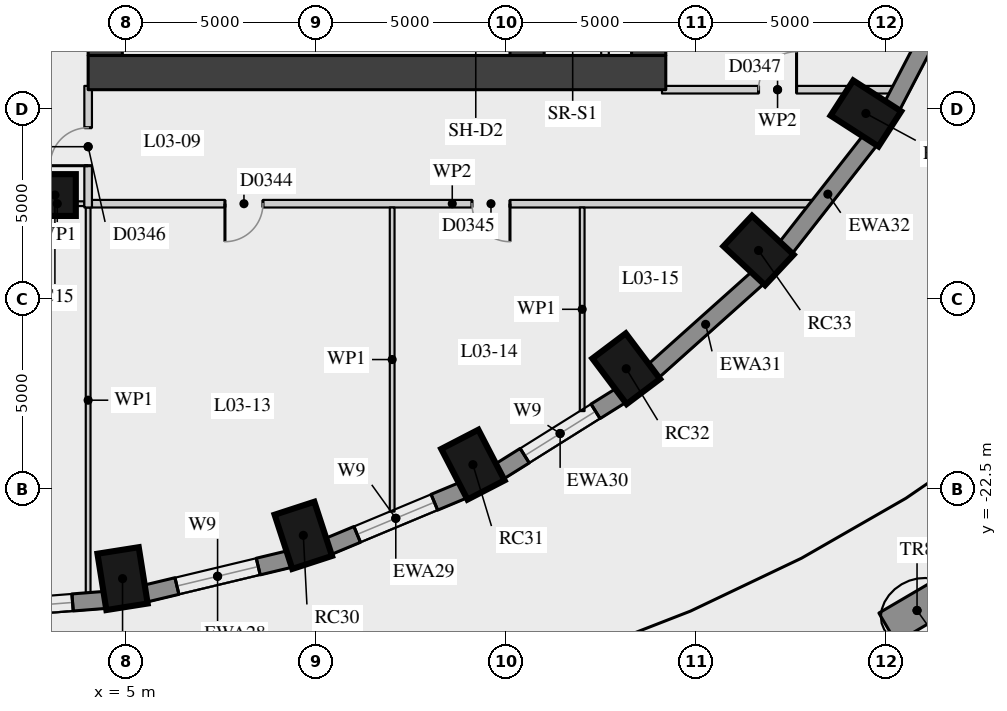
"""IFC4 building model, lengths in metres.
Left out: names, types, materials, properties, quantities, classifications, styles, units other than length and angle.
Written with IfcOpenShell. Run it as: python <this file> out.ifc"""

import sys

from ifc_helpers import new_model, si_unit, direction, frame, frame_2d, origin, origin_2d, place, context, subcontext, project, spatial, rectangle, extrude, element, fill, save


model = new_model("IFC4")
c1 = context("Model", 3, precision=1e-05, world=origin(), true_north=direction((0.0, 1.0)))
c2 = subcontext(c1, "Body", "Model", "MODEL_VIEW")
j1 = project(units=[si_unit("LENGTHUNIT", "METRE"), si_unit("PLANEANGLEUNIT", "RADIAN")], contexts=[c1])
p1 = place(None, origin())
s1 = spatial("IfcSite", under=j1, at=p1, CompositionType="ELEMENT")
p2 = place(p1, origin())
s2 = spatial("IfcBuilding", under=s1, at=p2, CompositionType="ELEMENT")
p3 = place(p2, frame((0.0, 0.0, 17.5)))
s3 = spatial("IfcBuildingStorey", under=s2, at=p3, CompositionType="ELEMENT", Elevation=17.5)
for number, where, z_axis, x_axis in (
    (1, (4.906, -24.866, 0.0), (0.0, 0.0, 1.0), (0.156, -0.988, 0.0)),
    (2, (9.662, -23.727, 0.0), (0.0, 0.0, 1.0), (0.31, -0.951, 0.0)),
    (3, (14.125, -21.867, 0.0), (0.0, 0.0, 1.0), (0.46, -0.888, 0.0)),
    (4, (18.159, -19.343, 0.0), (0.0, 0.0, 1.0), (0.601, -0.799, 0.0)),
    (5, (21.641, -16.23, 0.0), (0.0, 0.0, 1.0), (0.73, -0.683, 0.0)),
    (6, (24.465, -12.625, 0.0), (0.0, 0.0, 1.0), (0.841, -0.541, 0.0)),
):
    element("IfcColumn", number, at=place(p3, frame(where, z_axis=z_axis, x_axis=x_axis)), inside=s3, PredefinedType="COLUMN", context=c2, shape_type="SweptSolid", body=[
        extrude(rectangle(XDim=1.5, YDim=1.1, at=origin_2d()), origin(), (0.0, 0.0, 1.0), 4.2),
    ])
p4 = place(p3, frame((3.126, -14.772, 0.0), z_axis=(0.0, 0.0, 1.0), x_axis=(1.0, 0.0, 0.0)))
e7 = element("IfcColumn", 7, at=p4, inside=s3, PredefinedType="COLUMN", context=c2, shape_type="SweptSolid", body=[
    extrude(rectangle(XDim=1.1, YDim=1.1, at=origin_2d()), origin(), (0.0, 0.0, 1.0), 4.2),
])
p5 = place(p3, frame((0.53, -25.733, 0.0), z_axis=(0.0, 0.0, 1.0), x_axis=(0.996955972145, 0.077966592873, 0.0)))
e8 = element("IfcWall", 8, at=p5, inside=s3, PredefinedType="SOLIDWALL", context=c2, shape_type="SweptSolid", body=[
    extrude(rectangle(XDim=3.939, YDim=0.45, at=frame_2d((1.97, 0.0))), origin(), (0.0, 0.0, 1.0), 3.92),
])
p6 = place(p5, frame((0.87, 0.0, 0.4)))
e9 = element("IfcOpeningElement", 9, at=p6, cuts=e8, PredefinedType="OPENING", context=c2, shape_type="SweptSolid", body=[
    extrude(rectangle(XDim=2.2, YDim=2.8, at=frame_2d((1.1, 1.4))), frame((0.0, 0.235, 0.0), z_axis=(0.0, -1.0, 0.0), x_axis=(1.0, 0.0, 0.0)), (0.0, 0.0, 1.0), 0.47),
])
p7 = place(p3, frame((5.504, -25.26, 0.0), z_axis=(0.0, 0.0, 1.0), x_axis=(0.972496561493, 0.232917233979, 0.0)))
e10 = element("IfcWall", 10, at=p7, inside=s3, PredefinedType="SOLIDWALL", context=c2, shape_type="SweptSolid", body=[
    extrude(rectangle(XDim=3.911, YDim=0.45, at=frame_2d((1.956, 0.0))), origin(), (0.0, 0.0, 1.0), 3.92),
])
p8 = place(p7, frame((0.855, 0.0, 0.4)))
e11 = element("IfcOpeningElement", 11, at=p8, cuts=e10, PredefinedType="OPENING", context=c2, shape_type="SweptSolid", body=[
    extrude(rectangle(XDim=2.2, YDim=2.8, at=frame_2d((1.1, 1.4))), frame((0.0, 0.235, 0.0), z_axis=(0.0, -1.0, 0.0), x_axis=(1.0, 0.0, 0.0)), (0.0, 0.0, 1.0), 0.47),
])
p9 = place(p3, frame((10.315, -24.021, 0.0), z_axis=(0.0, 0.0, 1.0), x_axis=(0.923031964282, 0.384723267966, 0.0)))
e12 = element("IfcWall", 12, at=p9, inside=s3, PredefinedType="SOLIDWALL", context=c2, shape_type="SweptSolid", body=[
    extrude(rectangle(XDim=3.856, YDim=0.45, at=frame_2d((1.928, 0.0))), origin(), (0.0, 0.0, 1.0), 3.92),
])
p10 = place(p9, frame((0.828, 0.0, 0.4)))
e13 = element("IfcOpeningElement", 13, at=p10, cuts=e12, PredefinedType="OPENING", context=c2, shape_type="SweptSolid", body=[
    extrude(rectangle(XDim=2.2, YDim=2.8, at=frame_2d((1.1, 1.4))), frame((0.0, 0.235, 0.0), z_axis=(0.0, -1.0, 0.0), x_axis=(1.0, 0.0, 0.0)), (0.0, 0.0, 1.0), 0.47),
])
p11 = place(p3, frame((14.817, -22.051, 0.0), z_axis=(0.0, 0.0, 1.0), x_axis=(0.847635480093, 0.530579016629, 0.0)))
e14 = element("IfcWall", 14, at=p11, inside=s3, PredefinedType="SOLIDWALL", context=c2, shape_type="SweptSolid", body=[
    extrude(rectangle(XDim=3.782, YDim=0.45, at=frame_2d((1.891, 0.0))), origin(), (0.0, 0.0, 1.0), 3.92),
])
p12 = place(p11, frame((0.791, 0.0, 0.4)))
e15 = element("IfcOpeningElement", 15, at=p12, cuts=e14, PredefinedType="OPENING", context=c2, shape_type="SweptSolid", body=[
    extrude(rectangle(XDim=2.2, YDim=2.8, at=frame_2d((1.1, 1.4))), frame((0.0, 0.235, 0.0), z_axis=(0.0, -1.0, 0.0), x_axis=(1.0, 0.0, 0.0)), (0.0, 0.0, 1.0), 0.47),
])
p13 = place(p3, frame((18.871, -19.407, 0.0), z_axis=(0.0, 0.0, 1.0), x_axis=(0.745526233716, 0.66647628228, 0.0)))
e16 = element("IfcWall", 16, at=p13, inside=s3, PredefinedType="SOLIDWALL", context=c2, shape_type="SweptSolid", body=[
    extrude(rectangle(XDim=3.697, YDim=0.45, at=frame_2d((1.848, 0.0))), origin(), (0.0, 0.0, 1.0), 3.92),
])
p14 = place(p3, frame((22.352, -16.17, 0.0), z_axis=(0.0, 0.0, 1.0), x_axis=(0.616661975264, 0.787228053529, 0.0)))
e17 = element("IfcWall", 17, at=p14, inside=s3, PredefinedType="SOLIDWALL", context=c2, shape_type="SweptSolid", body=[
    extrude(rectangle(XDim=3.61, YDim=0.45, at=frame_2d((1.805, 0.0))), origin(), (0.0, 0.0, 1.0), 3.92),
])
p15 = place(p3, frame((25.152, -12.437, 0.0), z_axis=(0.0, 0.0, 1.0), x_axis=(0.462492775226, 0.886623050041, 0.0)))
e18 = element("IfcWall", 18, at=p15, inside=s3, PredefinedType="SOLIDWALL", context=c2, shape_type="SweptSolid", body=[
    extrude(rectangle(XDim=3.532, YDim=0.45, at=frame_2d((1.766, 0.0))), origin(), (0.0, 0.0, 1.0), 3.92),
])
p16 = place(p3, frame((21.914, -29.349, 0.0), z_axis=(0.0, 0.0, 1.0), x_axis=(0.879522517586, 0.47585726963, 0.0)))
e19 = element("IfcWall", 19, at=p16, inside=s3, PredefinedType="PARAPET", context=c2, shape_type="SweptSolid", body=[
    extrude(rectangle(XDim=7.203, YDim=0.25, at=frame_2d((3.602, 0.0))), origin(), (0.0, 0.0, 1.0), 1.2),
])
p17 = place(p3, frame((25.035, -26.16, 0.0), z_axis=(0.0, 0.0, 1.0), x_axis=(0.862655115123, 0.505792598159, 0.0)))
e20 = element("IfcWall", 20, at=p17, inside=s3, PredefinedType="USERDEFINED", context=c2, shape_type="SweptSolid", body=[
    extrude(rectangle(XDim=1.8, YDim=0.9, at=frame_2d((0.9, 0.0))), origin(), (0.0, 0.0, 1.0), 0.75),
])
p18 = place(p3, frame((4.45, -11.1, 0.0), z_axis=(0.0, 0.0, 1.0), x_axis=(0.0, 1.0, 0.0)))
e21 = element("IfcWall", 21, at=p18, inside=s3, PredefinedType="SHEAR", context=c2, shape_type="SweptSolid", body=[
    extrude(rectangle(XDim=22.2, YDim=0.9, at=frame_2d((11.1, 0.0))), origin(), (0.0, 0.0, 1.0), 3.92),
])
p19 = place(p18, frame((2.35, 0.0, 0.0)))
e22 = element("IfcOpeningElement", 22, at=p19, cuts=e21, PredefinedType="OPENING", context=c2, shape_type="SweptSolid", body=[
    extrude(rectangle(XDim=1.5, YDim=2.1, at=frame_2d((0.75, 1.05))), frame((0.0, 0.46, 0.0), z_axis=(0.0, -1.0, 0.0), x_axis=(1.0, 0.0, 0.0)), (0.0, 0.0, 1.0), 0.92),
])
p20 = place(p18, frame((5.45, 0.0, 0.0)))
e23 = element("IfcOpeningElement", 23, at=p20, cuts=e21, PredefinedType="OPENING", context=c2, shape_type="SweptSolid", body=[
    extrude(rectangle(XDim=1.8, YDim=2.1, at=frame_2d((0.9, 1.05))), frame((0.0, 0.46, 0.0), z_axis=(0.0, -1.0, 0.0), x_axis=(1.0, 0.0, 0.0)), (0.0, 0.0, 1.0), 0.92),
])
p21 = place(p18, frame((7.95, 0.0, 0.0)))
e24 = element("IfcOpeningElement", 24, at=p21, cuts=e21, PredefinedType="OPENING", context=c2, shape_type="SweptSolid", body=[
    extrude(rectangle(XDim=1.1, YDim=2.1, at=frame_2d((0.55, 1.05))), frame((0.0, 0.46, 0.0), z_axis=(0.0, -1.0, 0.0), x_axis=(1.0, 0.0, 0.0)), (0.0, 0.0, 1.0), 0.92),
])
p22 = place(p18, frame((10.6, 0.0, 0.0)))
e25 = element("IfcOpeningElement", 25, at=p22, cuts=e21, PredefinedType="OPENING", context=c2, shape_type="SweptSolid", body=[
    extrude(rectangle(XDim=1.0, YDim=2.1, at=frame_2d((0.5, 1.05))), frame((0.0, 0.46, 0.0), z_axis=(0.0, -1.0, 0.0), x_axis=(1.0, 0.0, 0.0)), (0.0, 0.0, 1.0), 0.92),
])
p23 = place(p18, frame((13.15, 0.0, 0.0)))
e26 = element("IfcOpeningElement", 26, at=p23, cuts=e21, PredefinedType="OPENING", context=c2, shape_type="SweptSolid", body=[
    extrude(rectangle(XDim=1.1, YDim=2.1, at=frame_2d((0.55, 1.05))), frame((0.0, 0.46, 0.0), z_axis=(0.0, -1.0, 0.0), x_axis=(1.0, 0.0, 0.0)), (0.0, 0.0, 1.0), 0.92),
])
p24 = place(p18, frame((14.95, 0.0, 0.0)))
e27 = element("IfcOpeningElement", 27, at=p24, cuts=e21, PredefinedType="OPENING", context=c2, shape_type="SweptSolid", body=[
    extrude(rectangle(XDim=1.8, YDim=2.1, at=frame_2d((0.9, 1.05))), frame((0.0, 0.46, 0.0), z_axis=(0.0, -1.0, 0.0), x_axis=(1.0, 0.0, 0.0)), (0.0, 0.0, 1.0), 0.92),
])
p25 = place(p18, frame((18.35, 0.0, 0.0)))
e28 = element("IfcOpeningElement", 28, at=p25, cuts=e21, PredefinedType="OPENING", context=c2, shape_type="SweptSolid", body=[
    extrude(rectangle(XDim=1.5, YDim=2.1, at=frame_2d((0.75, 1.05))), frame((0.0, 0.46, 0.0), z_axis=(0.0, -1.0, 0.0), x_axis=(1.0, 0.0, 0.0)), (0.0, 0.0, 1.0), 0.92),
])
p26 = place(p3, frame((18.75, -11.1, 0.0), z_axis=(0.0, 0.0, 1.0), x_axis=(0.0, 1.0, 0.0)))
e29 = element("IfcWall", 29, at=p26, inside=s3, PredefinedType="SHEAR", context=c2, shape_type="SweptSolid", body=[
    extrude(rectangle(XDim=22.2, YDim=0.9, at=frame_2d((11.1, 0.0))), origin(), (0.0, 0.0, 1.0), 3.92),
])
p27 = place(p3, frame((4.0, -11.55, 0.0), z_axis=(0.0, 0.0, 1.0), x_axis=(1.0, 0.0, 0.0)))
e30 = element("IfcWall", 30, at=p27, inside=s3, PredefinedType="SHEAR", context=c2, shape_type="SweptSolid", body=[
    extrude(rectangle(XDim=15.2, YDim=0.9, at=frame_2d((7.6, 0.0))), origin(), (0.0, 0.0, 1.0), 3.92),
])
p28 = place(p3, frame((15.55, -11.1, 0.0), z_axis=(0.0, 0.0, 1.0), x_axis=(0.0, 1.0, 0.0)))
e31 = element("IfcWall", 31, at=p28, inside=s3, PredefinedType="SHEAR", context=c2, shape_type="SweptSolid", body=[
    extrude(rectangle(XDim=22.2, YDim=0.9, at=frame_2d((11.1, 0.0))), origin(), (0.0, 0.0, 1.0), 3.92),
])
p29 = place(p28, frame((15.6, 0.0, 0.0)))
e32 = element("IfcOpeningElement", 32, at=p29, cuts=e31, PredefinedType="OPENING", context=c2, shape_type="SweptSolid", body=[
    extrude(rectangle(XDim=1.0, YDim=2.1, at=frame_2d((0.5, 1.05))), frame((0.0, 0.46, 0.0), z_axis=(0.0, -1.0, 0.0), x_axis=(1.0, 0.0, 0.0)), (0.0, 0.0, 1.0), 0.92),
])
p30 = place(p28, frame((5.6, 0.0, 0.0)))
e33 = element("IfcOpeningElement", 33, at=p30, cuts=e31, PredefinedType="OPENING", context=c2, shape_type="SweptSolid", body=[
    extrude(rectangle(XDim=1.0, YDim=2.1, at=frame_2d((0.5, 1.05))), frame((0.0, 0.46, 0.0), z_axis=(0.0, -1.0, 0.0), x_axis=(1.0, 0.0, 0.0)), (0.0, 0.0, 1.0), 0.92),
])
p31 = place(p3, frame((17.6, -11.1, 0.0), z_axis=(0.0, 0.0, 1.0), x_axis=(0.0, 1.0, 0.0)))
e34 = element("IfcWall", 34, at=p31, inside=s3, PredefinedType="PARTITIONING", context=c2, shape_type="SweptSolid", body=[
    extrude(rectangle(XDim=3.7, YDim=0.2, at=frame_2d((1.85, 0.0))), origin(), (0.0, 0.0, 1.0), 3.92),
])
p32 = place(p3, frame((2.475, -15.0, 0.0), z_axis=(0.0, 0.0, 1.0), x_axis=(1.0, 0.0, 0.0)))
e35 = element("IfcWall", 35, at=p32, inside=s3, PredefinedType="PARTITIONING", context=c2, shape_type="SweptSolid", body=[
    extrude(rectangle(XDim=1.425, YDim=0.125, at=frame_2d((0.712, 0.0))), origin(), (0.0, 0.0, 1.0), 3.92),
])
p33 = place(p3, frame((4.1, -15.0, 0.0), z_axis=(0.0, 0.0, 1.0), x_axis=(1.0, 0.0, 0.0)))
e36 = element("IfcWall", 36, at=p33, inside=s3, PredefinedType="PARTITIONING", context=c2, shape_type="SweptSolid", body=[
    extrude(rectangle(XDim=18.962, YDim=0.2, at=frame_2d((9.481, 0.0))), origin(), (0.0, 0.0, 1.0), 3.92),
])
p34 = place(p33, frame((3.5, 0.0, 0.0)))
e37 = element("IfcOpeningElement", 37, at=p34, cuts=e36, PredefinedType="OPENING", context=c2, shape_type="SweptSolid", body=[
    extrude(rectangle(XDim=1.0, YDim=2.1, at=frame_2d((0.5, 1.05))), frame((0.0, 0.11, 0.0), z_axis=(0.0, -1.0, 0.0), x_axis=(1.0, 0.0, 0.0)), (0.0, 0.0, 1.0), 0.22),
])
p35 = place(p33, frame((10.0, 0.0, 0.0)))
e38 = element("IfcOpeningElement", 38, at=p35, cuts=e36, PredefinedType="OPENING", context=c2, shape_type="SweptSolid", body=[
    extrude(rectangle(XDim=1.0, YDim=2.1, at=frame_2d((0.5, 1.05))), frame((0.0, 0.11, 0.0), z_axis=(0.0, -1.0, 0.0), x_axis=(1.0, 0.0, 0.0)), (0.0, 0.0, 1.0), 0.22),
])
p36 = place(p3, frame((19.1, -12.0, 0.0), z_axis=(0.0, 0.0, 1.0), x_axis=(1.0, 0.0, 0.0)))
e39 = element("IfcWall", 39, at=p36, inside=s3, PredefinedType="PARTITIONING", context=c2, shape_type="SweptSolid", body=[
    extrude(rectangle(XDim=6.082, YDim=0.2, at=frame_2d((3.041, 0.0))), origin(), (0.0, 0.0, 1.0), 3.92),
])
p37 = place(p36, frame((2.541, 0.0, 0.0)))
e40 = element("IfcOpeningElement", 40, at=p37, cuts=e39, PredefinedType="OPENING", context=c2, shape_type="SweptSolid", body=[
    extrude(rectangle(XDim=1.0, YDim=2.1, at=frame_2d((0.5, 1.05))), frame((0.0, 0.11, 0.0), z_axis=(0.0, -1.0, 0.0), x_axis=(1.0, 0.0, 0.0)), (0.0, 0.0, 1.0), 0.22),
])
p38 = place(p3, frame((4.0, -25.242, 0.0), z_axis=(0.0, 0.0, 1.0), x_axis=(0.0, 1.0, 0.0)))
e41 = element("IfcWall", 41, at=p38, inside=s3, PredefinedType="PARTITIONING", context=c2, shape_type="SweptSolid", body=[
    extrude(rectangle(XDim=10.142, YDim=0.125, at=frame_2d((5.071, 0.0))), origin(), (0.0, 0.0, 1.0), 3.92),
])
p39 = place(p3, frame((4.0, -15.1, 0.0), z_axis=(0.0, 0.0, 1.0), x_axis=(0.0, 1.0, 0.0)))
e42 = element("IfcWall", 42, at=p39, inside=s3, PredefinedType="PARTITIONING", context=c2, shape_type="SweptSolid", body=[
    extrude(rectangle(XDim=3.2, YDim=0.2, at=frame_2d((1.6, 0.0))), origin(), (0.0, 0.0, 1.0), 3.92),
])
p40 = place(p39, frame((1.1, 0.0, 0.0)))
e43 = element("IfcOpeningElement", 43, at=p40, cuts=e42, PredefinedType="OPENING", context=c2, shape_type="SweptSolid", body=[
    extrude(rectangle(XDim=1.0, YDim=2.1, at=frame_2d((0.5, 1.05))), frame((0.0, 0.11, 0.0), z_axis=(0.0, -1.0, 0.0), x_axis=(1.0, 0.0, 0.0)), (0.0, 0.0, 1.0), 0.22),
])
p41 = place(p3, frame((12.0, -23.102, 0.0), z_axis=(0.0, 0.0, 1.0), x_axis=(0.0, 1.0, 0.0)))
e44 = element("IfcWall", 44, at=p41, inside=s3, PredefinedType="PARTITIONING", context=c2, shape_type="SweptSolid", body=[
    extrude(rectangle(XDim=8.002, YDim=0.125, at=frame_2d((4.001, 0.0))), origin(), (0.0, 0.0, 1.0), 3.92),
])
p42 = place(p3, frame((17.0, -20.458, 0.0), z_axis=(0.0, 0.0, 1.0), x_axis=(0.0, 1.0, 0.0)))
e45 = element("IfcWall", 45, at=p42, inside=s3, PredefinedType="PARTITIONING", context=c2, shape_type="SweptSolid", body=[
    extrude(rectangle(XDim=5.357, YDim=0.125, at=frame_2d((2.679, 0.0))), origin(), (0.0, 0.0, 1.0), 3.92),
])
p43 = place(p6, origin())
e46 = element("IfcWindow", 46, at=p43, inside=s3, PartitioningType="SINGLE_PANEL", PredefinedType="WINDOW", context=c2, shape_type="SweptSolid", body=[
    extrude(rectangle(XDim=2.2, YDim=2.8, at=frame_2d((1.1, 1.4))), frame((0.0, 0.035, 0.0), z_axis=(0.0, -1.0, 0.0), x_axis=(1.0, 0.0, 0.0)), (0.0, 0.0, 1.0), 0.06),
])
fill(e9, e46)
p44 = place(p8, origin())
e47 = element("IfcWindow", 47, at=p44, inside=s3, PartitioningType="SINGLE_PANEL", PredefinedType="WINDOW", context=c2, shape_type="SweptSolid", body=[
    extrude(rectangle(XDim=2.2, YDim=2.8, at=frame_2d((1.1, 1.4))), frame((0.0, 0.035, 0.0), z_axis=(0.0, -1.0, 0.0), x_axis=(1.0, 0.0, 0.0)), (0.0, 0.0, 1.0), 0.06),
])
fill(e11, e47)
p45 = place(p10, origin())
e48 = element("IfcWindow", 48, at=p45, inside=s3, PartitioningType="SINGLE_PANEL", PredefinedType="WINDOW", context=c2, shape_type="SweptSolid", body=[
    extrude(rectangle(XDim=2.2, YDim=2.8, at=frame_2d((1.1, 1.4))), frame((0.0, 0.035, 0.0), z_axis=(0.0, -1.0, 0.0), x_axis=(1.0, 0.0, 0.0)), (0.0, 0.0, 1.0), 0.06),
])
fill(e13, e48)
p46 = place(p12, origin())
e49 = element("IfcWindow", 49, at=p46, inside=s3, PartitioningType="SINGLE_PANEL", PredefinedType="WINDOW", context=c2, shape_type="SweptSolid", body=[
    extrude(rectangle(XDim=2.2, YDim=2.8, at=frame_2d((1.1, 1.4))), frame((0.0, 0.035, 0.0), z_axis=(0.0, -1.0, 0.0), x_axis=(1.0, 0.0, 0.0)), (0.0, 0.0, 1.0), 0.06),
])
fill(e15, e49)
p47 = place(p40, origin())
e50 = element("IfcDoor", 50, at=p47, inside=s3, OperationType="SINGLE_SWING_LEFT", PredefinedType="DOOR", context=c2, shape_type="SweptSolid", body=[
    extrude(rectangle(XDim=1.0, YDim=2.1, at=frame_2d((0.5, 1.05))), frame((0.0, 0.025, 0.0), z_axis=(0.0, -1.0, 0.0), x_axis=(1.0, 0.0, 0.0)), (0.0, 0.0, 1.0), 0.05),
])
fill(e43, e50)
p48 = place(p34, origin())
e51 = element("IfcDoor", 51, at=p48, inside=s3, OperationType="SINGLE_SWING_RIGHT", PredefinedType="DOOR", context=c2, shape_type="SweptSolid", body=[
    extrude(rectangle(XDim=1.0, YDim=2.1, at=frame_2d((0.5, 1.05))), frame((0.0, 0.025, 0.0), z_axis=(0.0, -1.0, 0.0), x_axis=(1.0, 0.0, 0.0)), (0.0, 0.0, 1.0), 0.05),
])
fill(e37, e51)
p49 = place(p35, origin())
e52 = element("IfcDoor", 52, at=p49, inside=s3, OperationType="SINGLE_SWING_LEFT", PredefinedType="DOOR", context=c2, shape_type="SweptSolid", body=[
    extrude(rectangle(XDim=1.0, YDim=2.1, at=frame_2d((0.5, 1.05))), frame((0.0, 0.025, 0.0), z_axis=(0.0, -1.0, 0.0), x_axis=(1.0, 0.0, 0.0)), (0.0, 0.0, 1.0), 0.05),
])
fill(e38, e52)
p50 = place(p37, origin())
e53 = element("IfcDoor", 53, at=p50, inside=s3, OperationType="SINGLE_SWING_RIGHT", PredefinedType="DOOR", context=c2, shape_type="SweptSolid", body=[
    extrude(rectangle(XDim=1.0, YDim=2.1, at=frame_2d((0.5, 1.05))), frame((0.0, 0.025, 0.0), z_axis=(0.0, -1.0, 0.0), x_axis=(1.0, 0.0, 0.0)), (0.0, 0.0, 1.0), 0.05),
])
fill(e40, e53)
save(model, sys.argv[1])
